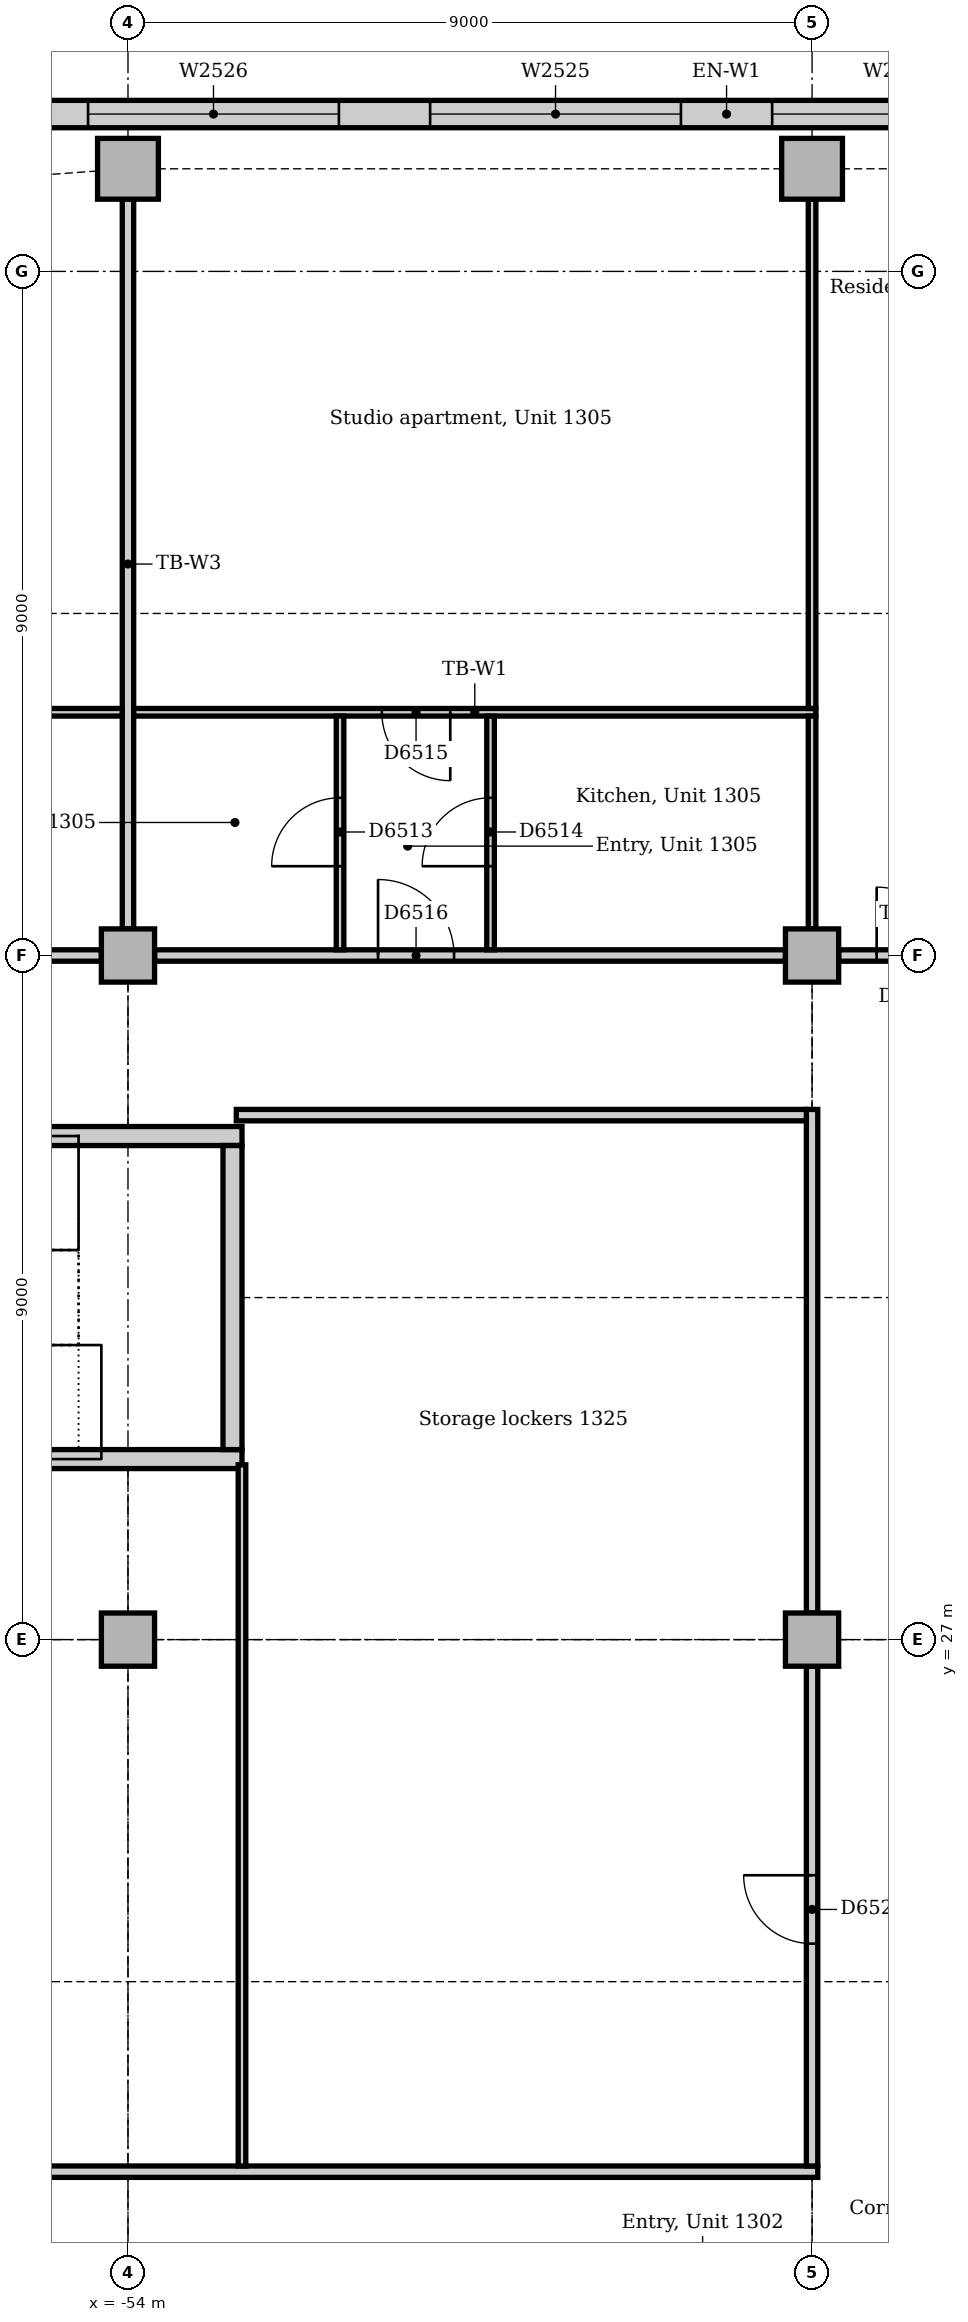
"""IFC4 building model, lengths in metres.
Left out: names, types, materials, properties, quantities, classifications, styles, units other than length and angle.
Written with IfcOpenShell. Run it as: python <this file> out.ifc"""

import sys

from ifc_helpers import new_model, si_unit, direction, frame, frame_2d, origin, origin_2d, place, context, subcontext, project, spatial, rectangle, extrude, element, fill, save


model = new_model("IFC4")
c1 = context("Model", 3, precision=1e-05, world=origin(), true_north=direction((0.0, 1.0)))
c2 = subcontext(c1, "Body", "Model", "MODEL_VIEW")
j1 = project(units=[si_unit("LENGTHUNIT", "METRE"), si_unit("PLANEANGLEUNIT", "RADIAN")], contexts=[c1])
p1 = place(None, origin())
s1 = spatial("IfcSite", under=j1, at=p1, CompositionType="ELEMENT")
p2 = place(p1, origin())
s2 = spatial("IfcBuilding", under=s1, at=p2, CompositionType="ELEMENT")
p3 = place(p2, frame((0.0, 0.0, 59.0)))
s3 = spatial("IfcBuildingStorey", under=s2, at=p3, CompositionType="ELEMENT", Elevation=59.0)
p4 = place(p3, frame((-60.0, 29.375, 0.0), z_axis=(0.0, 0.0, 1.0), x_axis=(1.0, 0.0, 0.0)))
e1 = element("IfcWall", 1, at=p4, inside=s3, PredefinedType="SOLIDWALL", context=c2, shape_type="SweptSolid", body=[
    extrude(rectangle(XDim=7.5, YDim=0.25, at=frame_2d((3.75, 0.0))), origin(), (0.0, 0.0, 1.0), 4.0),
])
p5 = place(p3, frame((-52.5, 33.625, 0.0), z_axis=(0.0, 0.0, 1.0), x_axis=(-1.0, 0.0, 0.0)))
e2 = element("IfcWall", 2, at=p5, inside=s3, PredefinedType="SOLIDWALL", context=c2, shape_type="SweptSolid", body=[
    extrude(rectangle(XDim=7.5, YDim=0.25, at=frame_2d((3.75, 0.0))), origin(), (0.0, 0.0, 1.0), 4.0),
])
p6 = place(p5, frame((6.0, 0.0, 0.0)))
e3 = element("IfcOpeningElement", 3, at=p6, cuts=e2, PredefinedType="OPENING", context=c2, shape_type="SweptSolid", body=[
    extrude(rectangle(XDim=1.0, YDim=2.1, at=frame_2d((0.5, 1.05))), frame((0.0, 0.135, 0.0), z_axis=(0.0, -1.0, 0.0), x_axis=(1.0, 0.0, 0.0)), (0.0, 0.0, 1.0), 0.27),
])
p7 = place(p3, frame((-52.625, 29.5, 0.0), z_axis=(0.0, 0.0, 1.0), x_axis=(0.0, 1.0, 0.0)))
e4 = element("IfcWall", 4, at=p7, inside=s3, PredefinedType="SOLIDWALL", context=c2, shape_type="SweptSolid", body=[
    extrude(rectangle(XDim=4.0, YDim=0.25, at=frame_2d((2.0, 0.0))), origin(), (0.0, 0.0, 1.0), 4.0),
])
for number, where, z_axis, x_axis in (
    (5, (-54.0, 46.35, 0.0), (0.0, 0.0, 1.0), (1.0, 0.0, 0.0)),
    (6, (-45.0, 46.35, 0.0), (0.0, 0.0, 1.0), (1.0, 0.0, 0.0)),
):
    element("IfcColumn", number, at=place(p3, frame(where, z_axis=z_axis, x_axis=x_axis)), inside=s3, PredefinedType="COLUMN", context=c2, shape_type="SweptSolid", body=[
        extrude(rectangle(XDim=0.8, YDim=0.8, at=origin_2d()), origin(), (0.0, 0.0, 1.0), 3.85),
    ])
for number, where, z_axis, x_axis in (
    (7, (-54.0, 27.0, 0.0), (0.0, 0.0, 1.0), (1.0, 0.0, 0.0)),
    (8, (-54.0, 36.0, 0.0), (0.0, 0.0, 1.0), (1.0, 0.0, 0.0)),
    (9, (-45.0, 27.0, 0.0), (0.0, 0.0, 1.0), (1.0, 0.0, 0.0)),
    (10, (-45.0, 36.0, 0.0), (0.0, 0.0, 1.0), (1.0, 0.0, 0.0)),
):
    element("IfcColumn", number, at=place(p3, frame(where, z_axis=z_axis, x_axis=x_axis)), inside=s3, PredefinedType="COLUMN", context=c2, shape_type="SweptSolid", body=[
        extrude(rectangle(XDim=0.7, YDim=0.7, at=origin_2d()), origin(), (0.0, 0.0, 1.0), 3.85),
    ])
p8 = place(p3, frame((-31.243, 47.07, 0.0), z_axis=(0.0, 0.0, 1.0), x_axis=(-1.0, 0.0, 0.0)))
e11 = element("IfcWall", 11, at=p8, inside=s3, PredefinedType="STANDARD", context=c2, shape_type="SweptSolid", body=[
    extrude(rectangle(XDim=29.765, YDim=0.36, at=frame_2d((14.882, 0.0))), origin(), (0.0, 0.0, 1.0), 3.85),
])
p9 = place(p8, frame((1.982, 0.0, 0.9)))
e12 = element("IfcOpeningElement", 12, at=p9, cuts=e11, PredefinedType="OPENING", context=c2, shape_type="SweptSolid", body=[
    extrude(rectangle(XDim=3.3, YDim=1.6, at=frame_2d((1.65, 0.8))), frame((0.0, 0.19, 0.0), z_axis=(0.0, -1.0, 0.0), x_axis=(1.0, 0.0, 0.0)), (0.0, 0.0, 1.0), 0.38),
])
p10 = place(p8, frame((6.482, 0.0, 0.9)))
e13 = element("IfcOpeningElement", 13, at=p10, cuts=e11, PredefinedType="OPENING", context=c2, shape_type="SweptSolid", body=[
    extrude(rectangle(XDim=3.3, YDim=1.6, at=frame_2d((1.65, 0.8))), frame((0.0, 0.19, 0.0), z_axis=(0.0, -1.0, 0.0), x_axis=(1.0, 0.0, 0.0)), (0.0, 0.0, 1.0), 0.38),
])
p11 = place(p8, frame((10.982, 0.0, 0.9)))
e14 = element("IfcOpeningElement", 14, at=p11, cuts=e11, PredefinedType="OPENING", context=c2, shape_type="SweptSolid", body=[
    extrude(rectangle(XDim=3.3, YDim=1.6, at=frame_2d((1.65, 0.8))), frame((0.0, 0.19, 0.0), z_axis=(0.0, -1.0, 0.0), x_axis=(1.0, 0.0, 0.0)), (0.0, 0.0, 1.0), 0.38),
])
p12 = place(p8, frame((15.482, 0.0, 0.9)))
e15 = element("IfcOpeningElement", 15, at=p12, cuts=e11, PredefinedType="OPENING", context=c2, shape_type="SweptSolid", body=[
    extrude(rectangle(XDim=3.3, YDim=1.6, at=frame_2d((1.65, 0.8))), frame((0.0, 0.19, 0.0), z_axis=(0.0, -1.0, 0.0), x_axis=(1.0, 0.0, 0.0)), (0.0, 0.0, 1.0), 0.38),
])
p13 = place(p8, frame((19.982, 0.0, 0.9)))
e16 = element("IfcOpeningElement", 16, at=p13, cuts=e11, PredefinedType="OPENING", context=c2, shape_type="SweptSolid", body=[
    extrude(rectangle(XDim=3.3, YDim=1.6, at=frame_2d((1.65, 0.8))), frame((0.0, 0.19, 0.0), z_axis=(0.0, -1.0, 0.0), x_axis=(1.0, 0.0, 0.0)), (0.0, 0.0, 1.0), 0.38),
])
p14 = place(p8, frame((24.482, 0.0, 0.9)))
e17 = element("IfcOpeningElement", 17, at=p14, cuts=e11, PredefinedType="OPENING", context=c2, shape_type="SweptSolid", body=[
    extrude(rectangle(XDim=3.3, YDim=1.6, at=frame_2d((1.65, 0.8))), frame((0.0, 0.19, 0.0), z_axis=(0.0, -1.0, 0.0), x_axis=(1.0, 0.0, 0.0)), (0.0, 0.0, 1.0), 0.38),
])
p15 = place(p3, frame((-44.65, 36.0, 0.0), z_axis=(0.0, 0.0, 1.0), x_axis=(1.0, 0.0, 0.0)))
e18 = element("IfcWall", 18, at=p15, inside=s3, PredefinedType="PARTITIONING", context=c2, shape_type="SweptSolid", body=[
    extrude(rectangle(XDim=1.925, YDim=0.15, at=frame_2d((0.963, 0.0))), origin(), (0.0, 0.0, 1.0), 3.602),
])
p16 = place(p15, frame((0.5, 0.0, 0.0)))
e19 = element("IfcOpeningElement", 19, at=p16, cuts=e18, PredefinedType="OPENING", context=c2, shape_type="SweptSolid", body=[
    extrude(rectangle(XDim=0.9, YDim=2.1, at=frame_2d((0.45, 1.05))), frame((0.0, 0.085, 0.0), z_axis=(0.0, -1.0, 0.0), x_axis=(1.0, 0.0, 0.0)), (0.0, 0.0, 1.0), 0.17),
])
p17 = place(p3, frame((-53.65, 36.0, 0.0), z_axis=(0.0, 0.0, 1.0), x_axis=(1.0, 0.0, 0.0)))
e20 = element("IfcWall", 20, at=p17, inside=s3, PredefinedType="PARTITIONING", context=c2, shape_type="SweptSolid", body=[
    extrude(rectangle(XDim=8.3, YDim=0.15, at=frame_2d((4.15, 0.0))), origin(), (0.0, 0.0, 1.0), 3.158),
])
p18 = place(p17, frame((2.94, 0.0, 0.0)))
e21 = element("IfcOpeningElement", 21, at=p18, cuts=e20, PredefinedType="OPENING", context=c2, shape_type="SweptSolid", body=[
    extrude(rectangle(XDim=1.0, YDim=2.1, at=frame_2d((0.5, 1.05))), frame((0.0, 0.085, 0.0), z_axis=(0.0, -1.0, 0.0), x_axis=(1.0, 0.0, 0.0)), (0.0, 0.0, 1.0), 0.17),
])
p19 = place(p3, frame((-62.6, 36.0, 0.0), z_axis=(0.0, 0.0, 1.0), x_axis=(1.0, 0.0, 0.0)))
e22 = element("IfcWall", 22, at=p19, inside=s3, PredefinedType="PARTITIONING", context=c2, shape_type="SweptSolid", body=[
    extrude(rectangle(XDim=8.25, YDim=0.15, at=frame_2d((4.125, 0.0))), origin(), (0.0, 0.0, 1.0), 3.158),
])
p20 = place(p19, frame((1.786, 0.0, 0.0)))
e23 = element("IfcOpeningElement", 23, at=p20, cuts=e22, PredefinedType="OPENING", context=c2, shape_type="SweptSolid", body=[
    extrude(rectangle(XDim=1.0, YDim=2.1, at=frame_2d((0.5, 1.05))), frame((0.0, 0.085, 0.0), z_axis=(0.0, -1.0, 0.0), x_axis=(1.0, 0.0, 0.0)), (0.0, 0.0, 1.0), 0.17),
])
p21 = place(p3, frame((-64.89, 20.0, 0.0), z_axis=(0.0, 0.0, 1.0), x_axis=(1.0, 0.0, 0.0)))
e24 = element("IfcWall", 24, at=p21, inside=s3, PredefinedType="PARTITIONING", context=c2, shape_type="SweptSolid", body=[
    extrude(rectangle(XDim=19.965, YDim=0.15, at=frame_2d((9.982, 0.0))), origin(), (0.0, 0.0, 1.0), 3.85),
])
p22 = place(p21, frame((2.05, 0.0, 0.0)))
e25 = element("IfcOpeningElement", 25, at=p22, cuts=e24, PredefinedType="OPENING", context=c2, shape_type="SweptSolid", body=[
    extrude(rectangle(XDim=0.9, YDim=2.1, at=frame_2d((0.45, 1.05))), frame((0.0, 0.085, 0.0), z_axis=(0.0, -1.0, 0.0), x_axis=(1.0, 0.0, 0.0)), (0.0, 0.0, 1.0), 0.17),
])
p23 = place(p21, frame((8.19, 0.0, 0.0)))
e26 = element("IfcOpeningElement", 26, at=p23, cuts=e24, PredefinedType="OPENING", context=c2, shape_type="SweptSolid", body=[
    extrude(rectangle(XDim=0.9, YDim=2.1, at=frame_2d((0.45, 1.05))), frame((0.0, 0.085, 0.0), z_axis=(0.0, -1.0, 0.0), x_axis=(1.0, 0.0, 0.0)), (0.0, 0.0, 1.0), 0.17),
])
p24 = place(p3, frame((-45.0, 20.075, 0.0), z_axis=(0.0, 0.0, 1.0), x_axis=(0.0, 1.0, 0.0)))
e27 = element("IfcWall", 27, at=p24, inside=s3, PredefinedType="PARTITIONING", context=c2, shape_type="SweptSolid", body=[
    extrude(rectangle(XDim=6.575, YDim=0.15, at=frame_2d((3.288, 0.0))), origin(), (0.0, 0.0, 1.0), 3.256),
])
p25 = place(p24, frame((2.925, 0.0, 0.0)))
e28 = element("IfcOpeningElement", 28, at=p25, cuts=e27, PredefinedType="OPENING", context=c2, shape_type="SweptSolid", body=[
    extrude(rectangle(XDim=0.9, YDim=2.1, at=frame_2d((0.45, 1.05))), frame((0.0, 0.085, 0.0), z_axis=(0.0, -1.0, 0.0), x_axis=(1.0, 0.0, 0.0)), (0.0, 0.0, 1.0), 0.17),
])
p26 = place(p3, frame((-45.0, 27.35, 0.0), z_axis=(0.0, 0.0, 1.0), x_axis=(0.0, 1.0, 0.0)))
e29 = element("IfcWall", 29, at=p26, inside=s3, PredefinedType="PARTITIONING", context=c2, shape_type="SweptSolid", body=[
    extrude(rectangle(XDim=6.625, YDim=0.15, at=frame_2d((3.312, 0.0))), origin(), (0.0, 0.0, 1.0), 3.256),
])
p27 = place(p3, frame((-52.575, 33.9, 0.0), z_axis=(0.0, 0.0, 1.0), x_axis=(1.0, 0.0, 0.0)))
e30 = element("IfcWall", 30, at=p27, inside=s3, PredefinedType="PARTITIONING", context=c2, shape_type="SweptSolid", body=[
    extrude(rectangle(XDim=7.5, YDim=0.15, at=frame_2d((3.75, 0.0))), origin(), (0.0, 0.0, 1.0), 3.85),
])
p28 = place(p3, frame((-54.0, 36.35, 0.0), z_axis=(0.0, 0.0, 1.0), x_axis=(0.0, 1.0, 0.0)))
e31 = element("IfcWall", 31, at=p28, inside=s3, PredefinedType="PARTITIONING", context=c2, shape_type="SweptSolid", body=[
    extrude(rectangle(XDim=9.6, YDim=0.15, at=frame_2d((4.8, 0.0))), origin(), (0.0, 0.0, 1.0), 3.256),
])
p29 = place(p3, frame((-53.925, 39.2, 0.0), z_axis=(0.0, 0.0, 1.0), x_axis=(1.0, 0.0, 0.0)))
e32 = element("IfcWall", 32, at=p29, inside=s3, PredefinedType="PARTITIONING", context=c2, shape_type="SweptSolid", body=[
    extrude(rectangle(XDim=8.975, YDim=0.1, at=frame_2d((4.487, 0.0))), origin(), (0.0, 0.0, 1.0), 3.85),
])
p30 = place(p29, frame((3.265, 0.0, 0.0)))
e33 = element("IfcOpeningElement", 33, at=p30, cuts=e32, PredefinedType="OPENING", context=c2, shape_type="SweptSolid", body=[
    extrude(rectangle(XDim=0.9, YDim=2.1, at=frame_2d((0.45, 1.05))), frame((0.0, 0.06, 0.0), z_axis=(0.0, -1.0, 0.0), x_axis=(1.0, 0.0, 0.0)), (0.0, 0.0, 1.0), 0.12),
])
p31 = place(p3, frame((-64.89, 39.2, 0.0), z_axis=(0.0, 0.0, 1.0), x_axis=(1.0, 0.0, 0.0)))
e34 = element("IfcWall", 34, at=p31, inside=s3, PredefinedType="PARTITIONING", context=c2, shape_type="SweptSolid", body=[
    extrude(rectangle(XDim=10.815, YDim=0.1, at=frame_2d((5.407, 0.0))), origin(), (0.0, 0.0, 1.0), 3.85),
])
p32 = place(p31, frame((4.126, 0.0, 0.0)))
e35 = element("IfcOpeningElement", 35, at=p32, cuts=e34, PredefinedType="OPENING", context=c2, shape_type="SweptSolid", body=[
    extrude(rectangle(XDim=0.9, YDim=2.1, at=frame_2d((0.45, 1.05))), frame((0.0, 0.06, 0.0), z_axis=(0.0, -1.0, 0.0), x_axis=(1.0, 0.0, 0.0)), (0.0, 0.0, 1.0), 0.12),
])
p33 = place(p3, frame((-45.0, 39.25, 0.0), z_axis=(0.0, 0.0, 1.0), x_axis=(0.0, 1.0, 0.0)))
e36 = element("IfcWall", 36, at=p33, inside=s3, PredefinedType="PARTITIONING", context=c2, shape_type="SweptSolid", body=[
    extrude(rectangle(XDim=6.7, YDim=0.1, at=frame_2d((3.35, 0.0))), origin(), (0.0, 0.0, 1.0), 3.256),
])
p34 = place(p3, frame((-45.0, 36.35, 0.0), z_axis=(0.0, 0.0, 1.0), x_axis=(0.0, 1.0, 0.0)))
e37 = element("IfcWall", 37, at=p34, inside=s3, PredefinedType="PARTITIONING", context=c2, shape_type="SweptSolid", body=[
    extrude(rectangle(XDim=2.8, YDim=0.1, at=frame_2d((1.4, 0.0))), origin(), (0.0, 0.0, 1.0), 3.256),
])
p35 = place(p3, frame((-52.5, 20.075, 0.0), z_axis=(0.0, 0.0, 1.0), x_axis=(0.0, 1.0, 0.0)))
e38 = element("IfcWall", 38, at=p35, inside=s3, PredefinedType="PARTITIONING", context=c2, shape_type="SweptSolid", body=[
    extrude(rectangle(XDim=9.225, YDim=0.1, at=frame_2d((4.612, 0.0))), origin(), (0.0, 0.0, 1.0), 3.85),
])
p36 = place(p3, frame((-51.21, 36.075, 0.0), z_axis=(0.0, 0.0, 1.0), x_axis=(0.0, 1.0, 0.0)))
e39 = element("IfcWall", 39, at=p36, inside=s3, PredefinedType="PARTITIONING", context=c2, shape_type="SweptSolid", body=[
    extrude(rectangle(XDim=3.075, YDim=0.1, at=frame_2d((1.538, 0.0))), origin(), (0.0, 0.0, 1.0), 3.85),
])
p37 = place(p36, frame((1.1, 0.0, 0.0)))
e40 = element("IfcOpeningElement", 40, at=p37, cuts=e39, PredefinedType="OPENING", context=c2, shape_type="SweptSolid", body=[
    extrude(rectangle(XDim=0.9, YDim=2.1, at=frame_2d((0.45, 1.05))), frame((0.0, 0.06, 0.0), z_axis=(0.0, -1.0, 0.0), x_axis=(1.0, 0.0, 0.0)), (0.0, 0.0, 1.0), 0.12),
])
p38 = place(p3, frame((-49.23, 36.075, 0.0), z_axis=(0.0, 0.0, 1.0), x_axis=(0.0, 1.0, 0.0)))
e41 = element("IfcWall", 41, at=p38, inside=s3, PredefinedType="PARTITIONING", context=c2, shape_type="SweptSolid", body=[
    extrude(rectangle(XDim=3.075, YDim=0.1, at=frame_2d((1.538, 0.0))), origin(), (0.0, 0.0, 1.0), 3.85),
])
p39 = place(p38, frame((1.1, 0.0, 0.0)))
e42 = element("IfcOpeningElement", 42, at=p39, cuts=e41, PredefinedType="OPENING", context=c2, shape_type="SweptSolid", body=[
    extrude(rectangle(XDim=0.9, YDim=2.1, at=frame_2d((0.45, 1.05))), frame((0.0, 0.06, 0.0), z_axis=(0.0, -1.0, 0.0), x_axis=(1.0, 0.0, 0.0)), (0.0, 0.0, 1.0), 0.12),
])
p40 = place(p11, origin())
e43 = element("IfcWindow", 43, at=p40, inside=s3, PartitioningType="SINGLE_PANEL", PredefinedType="WINDOW", context=c2, shape_type="SweptSolid", body=[
    extrude(rectangle(XDim=3.3, YDim=1.6, at=frame_2d((1.65, 0.8))), frame((0.0, 0.13, 0.0), z_axis=(0.0, -1.0, 0.0), x_axis=(1.0, 0.0, 0.0)), (0.0, 0.0, 1.0), 0.06),
])
fill(e14, e43)
p41 = place(p12, origin())
e44 = element("IfcWindow", 44, at=p41, inside=s3, PartitioningType="SINGLE_PANEL", PredefinedType="WINDOW", context=c2, shape_type="SweptSolid", body=[
    extrude(rectangle(XDim=3.3, YDim=1.6, at=frame_2d((1.65, 0.8))), frame((0.0, 0.13, 0.0), z_axis=(0.0, -1.0, 0.0), x_axis=(1.0, 0.0, 0.0)), (0.0, 0.0, 1.0), 0.06),
])
fill(e15, e44)
p42 = place(p13, origin())
e45 = element("IfcWindow", 45, at=p42, inside=s3, PartitioningType="SINGLE_PANEL", PredefinedType="WINDOW", context=c2, shape_type="SweptSolid", body=[
    extrude(rectangle(XDim=3.3, YDim=1.6, at=frame_2d((1.65, 0.8))), frame((0.0, 0.13, 0.0), z_axis=(0.0, -1.0, 0.0), x_axis=(1.0, 0.0, 0.0)), (0.0, 0.0, 1.0), 0.06),
])
fill(e16, e45)
p43 = place(p16, origin())
e46 = element("IfcDoor", 46, at=p43, inside=s3, OperationType="SINGLE_SWING_LEFT", PredefinedType="DOOR", context=c2, shape_type="SweptSolid", body=[
    extrude(rectangle(XDim=0.9, YDim=2.1, at=frame_2d((0.45, 1.05))), frame((0.0, 0.025, 0.0), z_axis=(0.0, -1.0, 0.0), x_axis=(1.0, 0.0, 0.0)), (0.0, 0.0, 1.0), 0.05),
])
fill(e19, e46)
p44 = place(p37, origin())
e47 = element("IfcDoor", 47, at=p44, inside=s3, OperationType="SINGLE_SWING_LEFT", PredefinedType="DOOR", context=c2, shape_type="SweptSolid", body=[
    extrude(rectangle(XDim=0.9, YDim=2.1, at=frame_2d((0.45, 1.05))), frame((0.0, 0.025, 0.0), z_axis=(0.0, -1.0, 0.0), x_axis=(1.0, 0.0, 0.0)), (0.0, 0.0, 1.0), 0.05),
])
fill(e40, e47)
p45 = place(p39, origin())
e48 = element("IfcDoor", 48, at=p45, inside=s3, OperationType="SINGLE_SWING_LEFT", PredefinedType="DOOR", context=c2, shape_type="SweptSolid", body=[
    extrude(rectangle(XDim=0.9, YDim=2.1, at=frame_2d((0.45, 1.05))), frame((0.0, 0.025, 0.0), z_axis=(0.0, -1.0, 0.0), x_axis=(1.0, 0.0, 0.0)), (0.0, 0.0, 1.0), 0.05),
])
fill(e42, e48)
p46 = place(p30, frame((0.9, 0.0, 0.0), z_axis=(0.0, 0.0, 1.0), x_axis=(-1.0, 0.0, 0.0)))
e49 = element("IfcDoor", 49, at=p46, inside=s3, OperationType="SINGLE_SWING_LEFT", PredefinedType="DOOR", context=c2, shape_type="SweptSolid", body=[
    extrude(rectangle(XDim=0.9, YDim=2.1, at=frame_2d((0.45, 1.05))), frame((0.0, 0.025, 0.0), z_axis=(0.0, -1.0, 0.0), x_axis=(1.0, 0.0, 0.0)), (0.0, 0.0, 1.0), 0.05),
])
fill(e33, e49)
p47 = place(p18, origin())
e50 = element("IfcDoor", 50, at=p47, inside=s3, OperationType="SINGLE_SWING_LEFT", PredefinedType="DOOR", context=c2, shape_type="SweptSolid", body=[
    extrude(rectangle(XDim=1.0, YDim=2.1, at=frame_2d((0.5, 1.05))), frame((0.0, 0.025, 0.0), z_axis=(0.0, -1.0, 0.0), x_axis=(1.0, 0.0, 0.0)), (0.0, 0.0, 1.0), 0.05),
])
fill(e21, e50)
p48 = place(p25, origin())
e51 = element("IfcDoor", 51, at=p48, inside=s3, OperationType="SINGLE_SWING_RIGHT", PredefinedType="DOOR", context=c2, shape_type="SweptSolid", body=[
    extrude(rectangle(XDim=0.9, YDim=2.1, at=frame_2d((0.45, 1.05))), frame((0.0, 0.025, 0.0), z_axis=(0.0, -1.0, 0.0), x_axis=(1.0, 0.0, 0.0)), (0.0, 0.0, 1.0), 0.05),
])
fill(e28, e51)
save(model, sys.argv[1])
